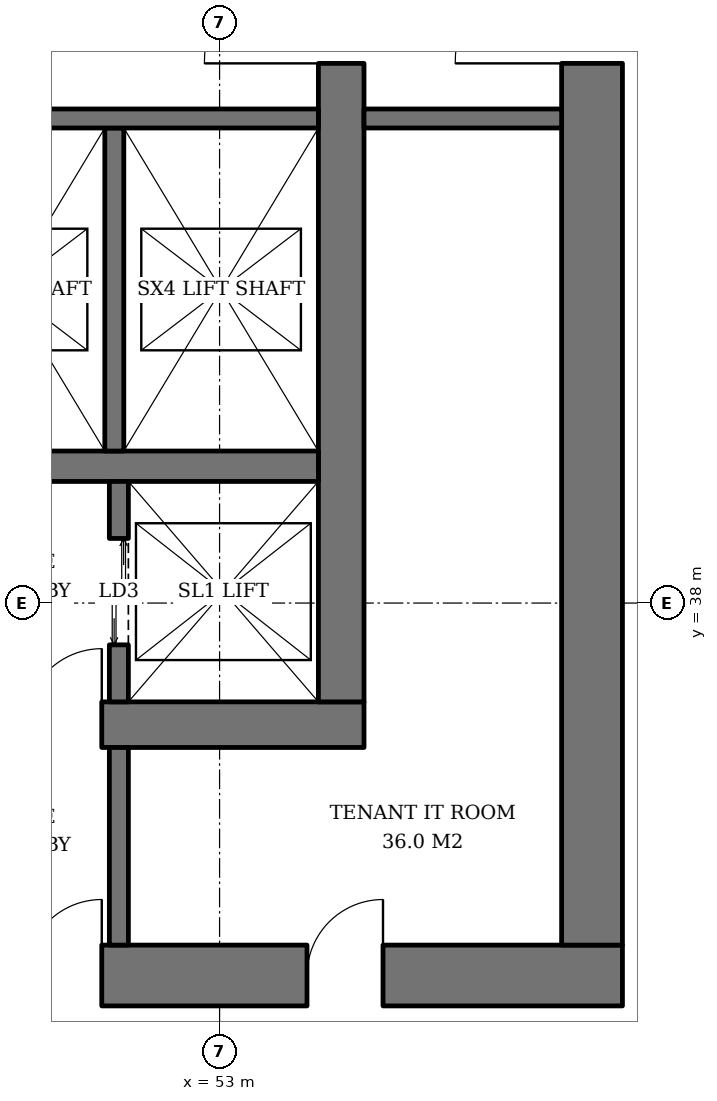
"""IFC4 building model, lengths in metres.
Left out: names, types, materials, properties, quantities, classifications, styles, units other than length and angle.
Written with IfcOpenShell. Run it as: python <this file> out.ifc"""

import sys

from ifc_helpers import new_model, si_unit, direction, frame, frame_2d, origin, place, context, subcontext, project, spatial, rectangle, extrude, element, fill, save


model = new_model("IFC4")
c1 = context("Model", 3, precision=1e-05, world=origin(), true_north=direction((0.0, 1.0)))
c2 = subcontext(c1, "Body", "Model", "MODEL_VIEW")
j1 = project(units=[si_unit("LENGTHUNIT", "METRE"), si_unit("PLANEANGLEUNIT", "RADIAN")], contexts=[c1])
p1 = place(None, origin())
s1 = spatial("IfcSite", under=j1, at=p1, CompositionType="ELEMENT")
p2 = place(p1, origin())
s2 = spatial("IfcBuilding", under=s1, at=p2, CompositionType="ELEMENT")
p3 = place(p2, frame((0.0, 0.0, 74.2)))
s3 = spatial("IfcBuildingStorey", under=s2, at=p3, CompositionType="ELEMENT", Elevation=74.2)
p4 = place(p3, frame((35.1, 36.4, 0.0), z_axis=(0.0, 0.0, 1.0), x_axis=(1.0, 0.0, 0.0)))
e1 = element("IfcWall", 1, at=p4, inside=s3, PredefinedType="SHEAR", context=c2, shape_type="SweptSolid", body=[
    extrude(rectangle(XDim=19.8, YDim=0.6, at=frame_2d((9.9, 0.0))), origin(), (0.0, 0.0, 1.0), 3.8),
])
p5 = place(p4, frame((3.9, 0.0, 0.0)))
e2 = element("IfcOpeningElement", 2, at=p5, cuts=e1, PredefinedType="OPENING", context=c2, shape_type="SweptSolid", body=[
    extrude(rectangle(XDim=1.0, YDim=2.1, at=frame_2d((0.5, 1.05))), frame((0.0, 0.31, 0.0), z_axis=(0.0, -1.0, 0.0), x_axis=(1.0, 0.0, 0.0)), (0.0, 0.0, 1.0), 0.62),
])
p6 = place(p4, frame((15.35, 0.0, 0.0)))
e3 = element("IfcOpeningElement", 3, at=p6, cuts=e1, PredefinedType="OPENING", context=c2, shape_type="SweptSolid", body=[
    extrude(rectangle(XDim=1.0, YDim=2.1, at=frame_2d((0.5, 1.05))), frame((0.0, 0.31, 0.0), z_axis=(0.0, -1.0, 0.0), x_axis=(1.0, 0.0, 0.0)), (0.0, 0.0, 1.0), 0.62),
])
p7 = place(p3, frame((54.6, 36.7, 0.0), z_axis=(0.0, 0.0, 1.0), x_axis=(0.0, 1.0, 0.0)))
e4 = element("IfcWall", 4, at=p7, inside=s3, PredefinedType="SHEAR", context=c2, shape_type="SweptSolid", body=[
    extrude(rectangle(XDim=18.6, YDim=0.6, at=frame_2d((9.3, 0.0))), origin(), (0.0, 0.0, 1.0), 3.8),
])
p8 = place(p7, frame((8.4, 0.0, 0.0)))
e5 = element("IfcOpeningElement", 5, at=p8, cuts=e4, PredefinedType="OPENING", context=c2, shape_type="SweptSolid", body=[
    extrude(rectangle(XDim=1.8, YDim=2.4, at=frame_2d((0.9, 1.2))), frame((0.0, 0.31, 0.0), z_axis=(0.0, -1.0, 0.0), x_axis=(1.0, 0.0, 0.0)), (0.0, 0.0, 1.0), 0.62),
])
p9 = place(p3, frame((31.7, 33.1, 0.0), z_axis=(0.0, 0.0, 1.0), x_axis=(1.0, 0.0, 0.0)))
e6 = element("IfcWall", 6, at=p9, inside=s3, PredefinedType="SHEAR", context=c2, shape_type="SweptSolid", body=[
    extrude(rectangle(XDim=26.6, YDim=0.8, at=frame_2d((13.3, 0.0))), origin(), (0.0, 0.0, 1.0), 3.8),
])
p10 = place(p9, frame((7.3, 0.0, 0.0)))
e7 = element("IfcOpeningElement", 7, at=p10, cuts=e6, PredefinedType="OPENING", context=c2, shape_type="SweptSolid", body=[
    extrude(rectangle(XDim=1.0, YDim=2.1, at=frame_2d((0.5, 1.05))), frame((0.0, 0.41, 0.0), z_axis=(0.0, -1.0, 0.0), x_axis=(1.0, 0.0, 0.0)), (0.0, 0.0, 1.0), 0.82),
])
p11 = place(p9, frame((18.75, 0.0, 0.0)))
e8 = element("IfcOpeningElement", 8, at=p11, cuts=e6, PredefinedType="OPENING", context=c2, shape_type="SweptSolid", body=[
    extrude(rectangle(XDim=1.0, YDim=2.1, at=frame_2d((0.5, 1.05))), frame((0.0, 0.41, 0.0), z_axis=(0.0, -1.0, 0.0), x_axis=(1.0, 0.0, 0.0)), (0.0, 0.0, 1.0), 0.82),
])
p12 = place(p9, frame((3.25, 0.0, 0.0)))
e9 = element("IfcOpeningElement", 9, at=p12, cuts=e6, PredefinedType="OPENING", context=c2, shape_type="SweptSolid", body=[
    extrude(rectangle(XDim=1.0, YDim=2.1, at=frame_2d((0.5, 1.05))), frame((0.0, 0.41, 0.0), z_axis=(0.0, -1.0, 0.0), x_axis=(1.0, 0.0, 0.0)), (0.0, 0.0, 1.0), 0.82),
])
p13 = place(p9, frame((10.42, 0.0, 0.0)))
e10 = element("IfcOpeningElement", 10, at=p13, cuts=e6, PredefinedType="OPENING", context=c2, shape_type="SweptSolid", body=[
    extrude(rectangle(XDim=1.0, YDim=2.1, at=frame_2d((0.5, 1.05))), frame((0.0, 0.41, 0.0), z_axis=(0.0, -1.0, 0.0), x_axis=(1.0, 0.0, 0.0)), (0.0, 0.0, 1.0), 0.82),
])
p14 = place(p9, frame((14.46, 0.0, 0.0)))
e11 = element("IfcOpeningElement", 11, at=p14, cuts=e6, PredefinedType="OPENING", context=c2, shape_type="SweptSolid", body=[
    extrude(rectangle(XDim=1.0, YDim=2.1, at=frame_2d((0.5, 1.05))), frame((0.0, 0.41, 0.0), z_axis=(0.0, -1.0, 0.0), x_axis=(1.0, 0.0, 0.0)), (0.0, 0.0, 1.0), 0.82),
])
p15 = place(p9, frame((22.45, 0.0, 0.0)))
e12 = element("IfcOpeningElement", 12, at=p15, cuts=e6, PredefinedType="OPENING", context=c2, shape_type="SweptSolid", body=[
    extrude(rectangle(XDim=1.0, YDim=2.1, at=frame_2d((0.5, 1.05))), frame((0.0, 0.41, 0.0), z_axis=(0.0, -1.0, 0.0), x_axis=(1.0, 0.0, 0.0)), (0.0, 0.0, 1.0), 0.82),
])
p16 = place(p3, frame((57.9, 33.5, 0.0), z_axis=(0.0, 0.0, 1.0), x_axis=(0.0, 1.0, 0.0)))
e13 = element("IfcWall", 13, at=p16, inside=s3, PredefinedType="SHEAR", context=c2, shape_type="SweptSolid", body=[
    extrude(rectangle(XDim=25.0, YDim=0.8, at=frame_2d((12.5, 0.0))), origin(), (0.0, 0.0, 1.0), 3.8),
])
p17 = place(p16, frame((11.6, 0.0, 0.0)))
e14 = element("IfcOpeningElement", 14, at=p17, cuts=e13, PredefinedType="OPENING", context=c2, shape_type="SweptSolid", body=[
    extrude(rectangle(XDim=1.8, YDim=2.4, at=frame_2d((0.9, 1.2))), frame((0.0, 0.41, 0.0), z_axis=(0.0, -1.0, 0.0), x_axis=(1.0, 0.0, 0.0)), (0.0, 0.0, 1.0), 0.82),
])
p18 = place(p3, frame((35.7, 39.8, 0.0), z_axis=(0.0, 0.0, 1.0), x_axis=(1.0, 0.0, 0.0)))
e15 = element("IfcWall", 15, at=p18, inside=s3, PredefinedType="SHEAR", context=c2, shape_type="SweptSolid", body=[
    extrude(rectangle(XDim=18.6, YDim=0.4, at=frame_2d((9.3, 0.0))), origin(), (0.0, 0.0, 1.0), 3.8),
])
p19 = place(p3, frame((51.675, 36.7, 0.0), z_axis=(0.0, 0.0, 1.0), x_axis=(0.0, 1.0, 0.0)))
e16 = element("IfcWall", 16, at=p19, inside=s3, PredefinedType="SHEAR", context=c2, shape_type="SweptSolid", body=[
    extrude(rectangle(XDim=2.9, YDim=0.25, at=frame_2d((1.45, 0.0))), origin(), (0.0, 0.0, 1.0), 3.8),
])
p20 = place(p19, frame((0.75, 0.0, 0.0)))
e17 = element("IfcOpeningElement", 17, at=p20, cuts=e16, PredefinedType="OPENING", context=c2, shape_type="SweptSolid", body=[
    extrude(rectangle(XDim=1.4, YDim=2.4, at=frame_2d((0.7, 1.2))), frame((0.0, 0.135, 0.0), z_axis=(0.0, -1.0, 0.0), x_axis=(1.0, 0.0, 0.0)), (0.0, 0.0, 1.0), 0.27),
])
p21 = place(p3, frame((51.615, 44.25, 0.0), z_axis=(0.0, 0.0, 1.0), x_axis=(0.0, -1.0, 0.0)))
e18 = element("IfcWall", 18, at=p21, inside=s3, PredefinedType="SHEAR", context=c2, shape_type="SweptSolid", body=[
    extrude(rectangle(XDim=4.25, YDim=0.25, at=frame_2d((2.125, 0.0))), origin(), (0.0, 0.0, 1.0), 3.8),
])
p22 = place(p3, frame((48.93, 44.375, 0.0), z_axis=(0.0, 0.0, 1.0), x_axis=(1.0, 0.0, 0.0)))
e19 = element("IfcWall", 19, at=p22, inside=s3, PredefinedType="SHEAR", context=c2, shape_type="SweptSolid", body=[
    extrude(rectangle(XDim=5.37, YDim=0.25, at=frame_2d((2.685, 0.0))), origin(), (0.0, 0.0, 1.0), 3.8),
])
for number, where, z_axis, x_axis in (
    (20, (54.9, 44.375, 0.0), (0.0, 0.0, 1.0), (1.0, 0.0, 0.0)),
    (21, (51.675, 33.5, 0.0), (0.0, 0.0, 1.0), (0.0, 1.0, 0.0)),
):
    element("IfcWall", number, at=place(p3, frame(where, z_axis=z_axis, x_axis=x_axis)), inside=s3, PredefinedType="SOLIDWALL", context=c2, shape_type="SweptSolid", body=[
        extrude(rectangle(XDim=2.6, YDim=0.25, at=frame_2d((1.3, 0.0))), origin(), (0.0, 0.0, 1.0), 3.62),
    ])
p23 = place(p20, origin())
e22 = element("IfcDoor", 22, at=p23, inside=s3, OperationType="DOUBLE_DOOR_SLIDING", PredefinedType="DOOR", context=c2, shape_type="SweptSolid", body=[
    extrude(rectangle(XDim=1.4, YDim=2.4, at=frame_2d((0.7, 1.2))), frame((0.0, 0.025, 0.0), z_axis=(0.0, -1.0, 0.0), x_axis=(1.0, 0.0, 0.0)), (0.0, 0.0, 1.0), 0.05),
])
fill(e17, e22)
p24 = place(p8, origin())
e23 = element("IfcDoor", 23, at=p24, inside=s3, OperationType="DOUBLE_DOOR_SINGLE_SWING", PredefinedType="DOOR", context=c2, shape_type="SweptSolid", body=[
    extrude(rectangle(XDim=1.8, YDim=2.4, at=frame_2d((0.9, 1.2))), frame((0.0, 0.025, 0.0), z_axis=(0.0, -1.0, 0.0), x_axis=(1.0, 0.0, 0.0)), (0.0, 0.0, 1.0), 0.05),
])
fill(e5, e23)
p25 = place(p6, origin())
e24 = element("IfcDoor", 24, at=p25, inside=s3, OperationType="SINGLE_SWING_RIGHT", PredefinedType="DOOR", context=c2, shape_type="SweptSolid", body=[
    extrude(rectangle(XDim=1.0, YDim=2.1, at=frame_2d((0.5, 1.05))), frame((0.0, 0.025, 0.0), z_axis=(0.0, -1.0, 0.0), x_axis=(1.0, 0.0, 0.0)), (0.0, 0.0, 1.0), 0.05),
])
fill(e3, e24)
p26 = place(p17, origin())
e25 = element("IfcDoor", 25, at=p26, inside=s3, OperationType="DOUBLE_DOOR_SINGLE_SWING", PredefinedType="DOOR", context=c2, shape_type="SweptSolid", body=[
    extrude(rectangle(XDim=1.8, YDim=2.4, at=frame_2d((0.9, 1.2))), frame((0.0, 0.025, 0.0), z_axis=(0.0, -1.0, 0.0), x_axis=(1.0, 0.0, 0.0)), (0.0, 0.0, 1.0), 0.05),
])
fill(e14, e25)
p27 = place(p11, origin())
e26 = element("IfcDoor", 26, at=p27, inside=s3, OperationType="SINGLE_SWING_RIGHT", PredefinedType="DOOR", context=c2, shape_type="SweptSolid", body=[
    extrude(rectangle(XDim=1.0, YDim=2.1, at=frame_2d((0.5, 1.05))), frame((0.0, 0.025, 0.0), z_axis=(0.0, -1.0, 0.0), x_axis=(1.0, 0.0, 0.0)), (0.0, 0.0, 1.0), 0.05),
])
fill(e8, e26)
p28 = place(p15, origin())
e27 = element("IfcDoor", 27, at=p28, inside=s3, OperationType="SINGLE_SWING_RIGHT", PredefinedType="DOOR", context=c2, shape_type="SweptSolid", body=[
    extrude(rectangle(XDim=1.0, YDim=2.1, at=frame_2d((0.5, 1.05))), frame((0.0, 0.39, 0.0), z_axis=(0.0, -1.0, 0.0), x_axis=(1.0, 0.0, 0.0)), (0.0, 0.0, 1.0), 0.05),
])
fill(e12, e27)
save(model, sys.argv[1])
